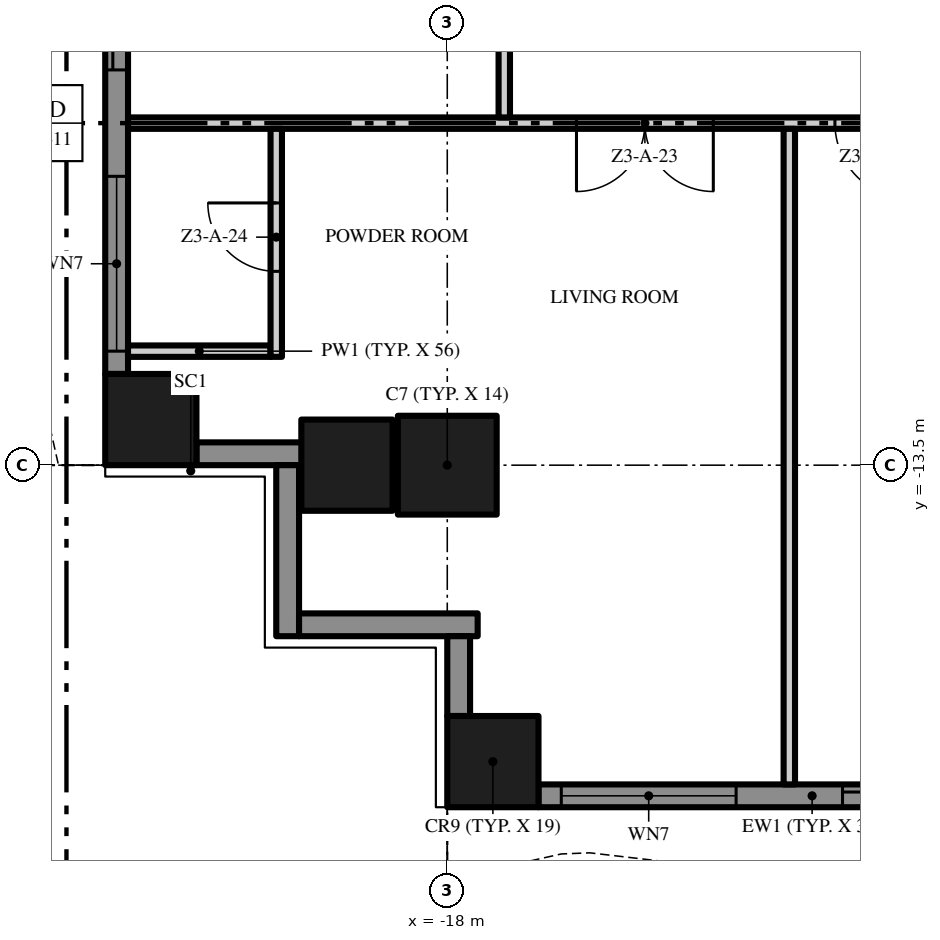
"""IFC4 building model, lengths in metres.
Left out: names, types, materials, properties, quantities, classifications, styles, units other than length and angle.
Written with IfcOpenShell. Run it as: python <this file> out.ifc"""

import sys

from ifc_helpers import new_model, si_unit, direction, frame, frame_2d, origin, origin_2d, place, context, subcontext, project, spatial, polyline, rectangle, outline, extrude, element, fill, save


model = new_model("IFC4")
c1 = context("Model", 3, precision=1e-05, world=origin(), true_north=direction((0.0, 1.0)))
c2 = subcontext(c1, "Body", "Model", "MODEL_VIEW")
j1 = project(units=[si_unit("LENGTHUNIT", "METRE"), si_unit("PLANEANGLEUNIT", "RADIAN")], contexts=[c1])
p1 = place(None, origin())
s1 = spatial("IfcSite", under=j1, at=p1, CompositionType="ELEMENT")
p2 = place(p1, origin())
s2 = spatial("IfcBuilding", under=s1, at=p2, CompositionType="ELEMENT")
p3 = place(p2, frame((0.0, 0.0, 132.6)))
s3 = spatial("IfcBuildingStorey", under=s2, at=p3, CompositionType="ELEMENT", Elevation=132.6)
p4 = place(p3, frame((-18.0, -13.5, 0.0), z_axis=(0.0, 0.0, 1.0), x_axis=(1.0, 0.0, 0.0)))
e1 = element("IfcColumn", 1, at=p4, inside=s3, PredefinedType="COLUMN", context=c2, shape_type="SweptSolid", body=[
    extrude(rectangle(XDim=1.3, YDim=1.3, at=origin_2d()), origin(), (0.0, 0.0, 1.0), 3.5),
])
for number, where, z_axis, x_axis in (
    (2, (-17.4, -17.4, 0.0), (0.0, 0.0, 1.0), (1.0, 0.0, 0.0)),
    (3, (-21.9, -12.9, 0.0), (0.0, 0.0, 1.0), (1.0, 0.0, 0.0)),
    (4, (-19.32, -13.5, 0.0), (0.0, 0.0, 1.0), (1.0, 0.0, 0.0)),
):
    element("IfcColumn", number, at=place(p3, frame(where, z_axis=z_axis, x_axis=x_axis)), inside=s3, PredefinedType="COLUMN", context=c2, shape_type="SweptSolid", body=[
        extrude(rectangle(XDim=1.2, YDim=1.2, at=origin_2d()), origin(), (0.0, 0.0, 1.0), 3.5),
    ])
p5 = place(p3, frame((-9.6, -17.85, 0.0), z_axis=(0.0, 0.0, 1.0), x_axis=(-1.0, 0.0, 0.0)))
e5 = element("IfcWall", 5, at=p5, inside=s3, PredefinedType="SOLIDWALL", context=c2, shape_type="SweptSolid", body=[
    extrude(rectangle(XDim=7.2, YDim=0.3, at=frame_2d((3.6, 0.0))), origin(), (0.0, 0.0, 1.0), 3.5),
])
p6 = place(p5, frame((4.6, 0.0, 0.45)))
e6 = element("IfcOpeningElement", 6, at=p6, cuts=e5, PredefinedType="OPENING", context=c2, shape_type="SweptSolid", body=[
    extrude(rectangle(XDim=2.3, YDim=2.65, at=frame_2d((1.15, 1.325))), frame((0.0, 0.16, 0.0), z_axis=(0.0, -1.0, 0.0), x_axis=(1.0, 0.0, 0.0)), (0.0, 0.0, 1.0), 0.32),
])
p7 = place(p5, frame((0.3, 0.0, 0.0)))
e7 = element("IfcOpeningElement", 7, at=p7, cuts=e5, PredefinedType="OPENING", context=c2, shape_type="SweptSolid", body=[
    extrude(rectangle(XDim=2.9, YDim=2.4, at=frame_2d((1.45, 1.2))), frame((0.0, 0.16, 0.0), z_axis=(0.0, -1.0, 0.0), x_axis=(1.0, 0.0, 0.0)), (0.0, 0.0, 1.0), 0.32),
])
p8 = place(p3, frame((-22.35, -12.3, 0.0), z_axis=(0.0, 0.0, 1.0), x_axis=(0.0, 1.0, 0.0)))
e8 = element("IfcWall", 8, at=p8, inside=s3, PredefinedType="SOLIDWALL", context=c2, shape_type="SweptSolid", body=[
    extrude(rectangle(XDim=7.2, YDim=0.3, at=frame_2d((3.6, 0.0))), origin(), (0.0, 0.0, 1.0), 3.5),
])
p9 = place(p8, frame((4.0, 0.0, 0.0)))
e9 = element("IfcOpeningElement", 9, at=p9, cuts=e8, PredefinedType="OPENING", context=c2, shape_type="SweptSolid", body=[
    extrude(rectangle(XDim=2.9, YDim=2.4, at=frame_2d((1.45, 1.2))), frame((0.0, 0.16, 0.0), z_axis=(0.0, -1.0, 0.0), x_axis=(1.0, 0.0, 0.0)), (0.0, 0.0, 1.0), 0.32),
])
p10 = place(p8, frame((0.3, 0.0, 0.45)))
e10 = element("IfcOpeningElement", 10, at=p10, cuts=e8, PredefinedType="OPENING", context=c2, shape_type="SweptSolid", body=[
    extrude(rectangle(XDim=2.3, YDim=2.65, at=frame_2d((1.15, 1.325))), frame((0.0, 0.16, 0.0), z_axis=(0.0, -1.0, 0.0), x_axis=(1.0, 0.0, 0.0)), (0.0, 0.0, 1.0), 0.32),
])
p11 = place(p3, frame((-19.85, -13.35, 0.0), z_axis=(0.0, 0.0, 1.0), x_axis=(-1.0, 0.0, 0.0)))
e11 = element("IfcWall", 11, at=p11, inside=s3, PredefinedType="SOLIDWALL", context=c2, shape_type="SweptSolid", body=[
    extrude(rectangle(XDim=1.45, YDim=0.3, at=frame_2d((0.725, 0.0))), origin(), (0.0, 0.0, 1.0), 3.5),
])
p12 = place(p3, frame((-20.1, -15.75, 0.0), z_axis=(0.0, 0.0, 1.0), x_axis=(0.0, 1.0, 0.0)))
e12 = element("IfcWall", 12, at=p12, inside=s3, PredefinedType="SOLIDWALL", context=c2, shape_type="SweptSolid", body=[
    extrude(rectangle(XDim=2.25, YDim=0.3, at=frame_2d((1.125, 0.0))), origin(), (0.0, 0.0, 1.0), 3.5),
])
p13 = place(p3, frame((-17.6, -15.6, 0.0), z_axis=(0.0, 0.0, 1.0), x_axis=(-1.0, 0.0, 0.0)))
e13 = element("IfcWall", 13, at=p13, inside=s3, PredefinedType="SOLIDWALL", context=c2, shape_type="SweptSolid", body=[
    extrude(rectangle(XDim=2.35, YDim=0.3, at=frame_2d((1.175, 0.0))), origin(), (0.0, 0.0, 1.0), 3.5),
])
p14 = place(p3, frame((-17.85, -16.8, 0.0), z_axis=(0.0, 0.0, 1.0), x_axis=(0.0, 1.0, 0.0)))
e14 = element("IfcWall", 14, at=p14, inside=s3, PredefinedType="SOLIDWALL", context=c2, shape_type="SweptSolid", body=[
    extrude(rectangle(XDim=1.05, YDim=0.3, at=frame_2d((0.525, 0.0))), origin(), (0.0, 0.0, 1.0), 3.5),
])
p15 = place(p3, origin())
e15 = element("IfcWall", 15, at=p15, inside=s3, PredefinedType="USERDEFINED", context=c2, shape_type="SweptSolid", body=[
    extrude(outline(polyline([(-18.0, -18.951), (-16.5, -18.615), (-16.125, -18.6), (-15.0, -18.731), (-13.5, -19.255), (-12.0, -19.988), (-10.5, -20.649), (-9.0, -20.985), (-8.625, -21.0), (-7.5, -20.869), (-6.0, -20.345), (-4.5, -19.612), (-3.0, -18.951), (-1.5, -18.615), (-1.125, -18.6), (0.0, -18.731), (1.5, -19.255), (3.0, -19.988), (4.5, -20.649), (6.0, -20.985), (6.375, -21.0), (7.5, -20.869), (9.0, -20.345), (10.5, -19.612), (12.0, -18.951), (13.5, -18.615), (13.875, -18.6), (15.0, -18.731), (16.5, -19.255), (18.0, -19.988), (18.11, -19.763), (16.596, -19.024), (15.056, -18.486), (13.885, -18.349), (13.467, -18.366), (11.921, -18.713), (10.395, -19.385), (8.904, -20.114), (7.444, -20.624), (6.365, -20.749), (6.033, -20.736), (4.579, -20.41), (3.105, -19.761), (1.596, -19.024), (0.056, -18.486), (-1.115, -18.349), (-1.533, -18.366), (-3.079, -18.713), (-4.605, -19.385), (-6.096, -20.114), (-7.556, -20.624), (-8.635, -20.749), (-8.967, -20.736), (-10.421, -20.41), (-11.895, -19.761), (-13.404, -19.024), (-14.944, -18.486), (-16.115, -18.349), (-16.533, -18.366), (-18.055, -18.708), (-18.0, -18.951)])), origin(), (0.0, 0.0, 1.0), 0.9),
])
p16 = place(p3, origin())
e16 = element("IfcWall", 16, at=p16, inside=s3, PredefinedType="USERDEFINED", context=c2, shape_type="SweptSolid", body=[
    extrude(outline(polyline([(-23.451, 18.0), (-23.115, 16.5), (-23.1, 16.125), (-23.231, 15.0), (-23.755, 13.5), (-24.488, 12.0), (-25.149, 10.5), (-25.485, 9.0), (-25.5, 8.625), (-25.369, 7.5), (-24.845, 6.0), (-24.112, 4.5), (-23.451, 3.0), (-23.115, 1.5), (-23.1, 1.125), (-23.231, 0.0), (-23.755, -1.5), (-24.488, -3.0), (-25.149, -4.5), (-25.485, -6.0), (-25.5, -6.375), (-25.369, -7.5), (-24.845, -9.0), (-24.112, -10.5), (-23.451, -12.0), (-23.115, -13.5), (-22.871, -13.445), (-23.213, -11.921), (-23.885, -10.395), (-24.614, -8.904), (-25.124, -7.444), (-25.249, -6.365), (-25.236, -6.033), (-24.91, -4.579), (-24.261, -3.105), (-23.524, -1.596), (-22.986, -0.056), (-22.849, 1.115), (-22.866, 1.533), (-23.213, 3.079), (-23.885, 4.605), (-24.614, 6.096), (-25.124, 7.556), (-25.249, 8.635), (-25.236, 8.967), (-24.91, 10.421), (-24.261, 11.895), (-23.524, 13.404), (-22.986, 14.944), (-22.849, 16.115), (-22.866, 16.533), (-23.208, 18.055), (-23.451, 18.0)])), origin(), (0.0, 0.0, 1.0), 0.9),
])
p17 = place(p3, frame((-22.2, -12.0, 0.0), z_axis=(0.0, 0.0, 1.0), x_axis=(1.0, 0.0, 0.0)))
e17 = element("IfcWall", 17, at=p17, inside=s3, PredefinedType="PARTITIONING", context=c2, shape_type="SweptSolid", body=[
    extrude(rectangle(XDim=1.875, YDim=0.15, at=frame_2d((0.938, 0.0))), origin(), (0.0, 0.0, 1.0), 3.5),
])
p18 = place(p3, frame((-11.325, -9.0, 0.0), z_axis=(0.0, 0.0, 1.0), x_axis=(-1.0, 0.0, 0.0)))
e18 = element("IfcWall", 18, at=p18, inside=s3, PredefinedType="PARTITIONING", context=c2, shape_type="SweptSolid", body=[
    extrude(rectangle(XDim=10.875, YDim=0.15, at=frame_2d((5.438, 0.0))), origin(), (0.0, 0.0, 1.0), 3.5),
])
p19 = place(p18, frame((3.175, 0.0, 0.0)))
e19 = element("IfcOpeningElement", 19, at=p19, cuts=e18, PredefinedType="OPENING", context=c2, shape_type="SweptSolid", body=[
    extrude(rectangle(XDim=1.8, YDim=2.4, at=frame_2d((0.9, 1.2))), frame((0.0, 0.085, 0.0), z_axis=(0.0, -1.0, 0.0), x_axis=(1.0, 0.0, 0.0)), (0.0, 0.0, 1.0), 0.17),
])
p20 = place(p18, frame((0.575, 0.0, 0.0)))
e20 = element("IfcOpeningElement", 20, at=p20, cuts=e18, PredefinedType="OPENING", context=c2, shape_type="SweptSolid", body=[
    extrude(rectangle(XDim=1.0, YDim=2.4, at=frame_2d((0.5, 1.2))), frame((0.0, 0.085, 0.0), z_axis=(0.0, -1.0, 0.0), x_axis=(1.0, 0.0, 0.0)), (0.0, 0.0, 1.0), 0.17),
])
p21 = place(p3, frame((-20.25, -12.075, 0.0), z_axis=(0.0, 0.0, 1.0), x_axis=(0.0, 1.0, 0.0)))
e21 = element("IfcWall", 21, at=p21, inside=s3, PredefinedType="PARTITIONING", context=c2, shape_type="SweptSolid", body=[
    extrude(rectangle(XDim=3.0, YDim=0.15, at=frame_2d((1.5, 0.0))), origin(), (0.0, 0.0, 1.0), 3.5),
])
p22 = place(p21, frame((1.125, 0.0, 0.0)))
e22 = element("IfcOpeningElement", 22, at=p22, cuts=e21, PredefinedType="OPENING", context=c2, shape_type="SweptSolid", body=[
    extrude(rectangle(XDim=0.9, YDim=2.1, at=frame_2d((0.45, 1.05))), frame((0.0, 0.085, 0.0), z_axis=(0.0, -1.0, 0.0), x_axis=(1.0, 0.0, 0.0)), (0.0, 0.0, 1.0), 0.17),
])
p23 = place(p3, frame((-17.25, -8.925, 0.0), z_axis=(0.0, 0.0, 1.0), x_axis=(0.0, 1.0, 0.0)))
e23 = element("IfcWall", 23, at=p23, inside=s3, PredefinedType="PARTITIONING", context=c2, shape_type="SweptSolid", body=[
    extrude(rectangle(XDim=4.5, YDim=0.15, at=frame_2d((2.25, 0.0))), origin(), (0.0, 0.0, 1.0), 3.5),
])
p24 = place(p3, frame((-13.5, -17.7, 0.0), z_axis=(0.0, 0.0, 1.0), x_axis=(0.0, 1.0, 0.0)))
e24 = element("IfcWall", 24, at=p24, inside=s3, PredefinedType="PARTITIONING", context=c2, shape_type="SweptSolid", body=[
    extrude(rectangle(XDim=8.625, YDim=0.15, at=frame_2d((4.312, 0.0))), origin(), (0.0, 0.0, 1.0), 3.5),
])
p25 = place(p6, origin())
e25 = element("IfcWindow", 25, at=p25, inside=s3, PartitioningType="SINGLE_PANEL", PredefinedType="WINDOW", context=c2, shape_type="SweptSolid", body=[
    extrude(rectangle(XDim=2.3, YDim=2.65, at=frame_2d((1.15, 1.325))), frame((0.0, 0.03, 0.0), z_axis=(0.0, -1.0, 0.0), x_axis=(1.0, 0.0, 0.0)), (0.0, 0.0, 1.0), 0.06),
])
fill(e6, e25)
p26 = place(p7, origin())
e26 = element("IfcDoor", 26, at=p26, inside=s3, OperationType="SINGLE_SWING_LEFT", PredefinedType="DOOR", context=c2, shape_type="SweptSolid", body=[
    extrude(rectangle(XDim=2.9, YDim=2.4, at=frame_2d((1.45, 1.2))), frame((0.0, 0.025, 0.0), z_axis=(0.0, -1.0, 0.0), x_axis=(1.0, 0.0, 0.0)), (0.0, 0.0, 1.0), 0.05),
])
fill(e7, e26)
p27 = place(p9, origin())
e27 = element("IfcDoor", 27, at=p27, inside=s3, OperationType="SINGLE_SWING_LEFT", PredefinedType="DOOR", context=c2, shape_type="SweptSolid", body=[
    extrude(rectangle(XDim=2.9, YDim=2.4, at=frame_2d((1.45, 1.2))), frame((0.0, 0.025, 0.0), z_axis=(0.0, -1.0, 0.0), x_axis=(1.0, 0.0, 0.0)), (0.0, 0.0, 1.0), 0.05),
])
fill(e9, e27)
p28 = place(p10, origin())
e28 = element("IfcWindow", 28, at=p28, inside=s3, PartitioningType="SINGLE_PANEL", PredefinedType="WINDOW", context=c2, shape_type="SweptSolid", body=[
    extrude(rectangle(XDim=2.3, YDim=2.65, at=frame_2d((1.15, 1.325))), frame((0.0, 0.03, 0.0), z_axis=(0.0, -1.0, 0.0), x_axis=(1.0, 0.0, 0.0)), (0.0, 0.0, 1.0), 0.06),
])
fill(e10, e28)
p29 = place(p19, origin())
e29 = element("IfcDoor", 29, at=p29, inside=s3, OperationType="DOUBLE_DOOR_SINGLE_SWING", PredefinedType="DOOR", context=c2, shape_type="SweptSolid", body=[
    extrude(rectangle(XDim=1.8, YDim=2.4, at=frame_2d((0.9, 1.2))), frame((0.0, 0.025, 0.0), z_axis=(0.0, -1.0, 0.0), x_axis=(1.0, 0.0, 0.0)), (0.0, 0.0, 1.0), 0.05),
])
fill(e19, e29)
p30 = place(p22, origin())
e30 = element("IfcDoor", 30, at=p30, inside=s3, OperationType="SINGLE_SWING_RIGHT", PredefinedType="DOOR", context=c2, shape_type="SweptSolid", body=[
    extrude(rectangle(XDim=0.9, YDim=2.1, at=frame_2d((0.45, 1.05))), frame((0.0, 0.025, 0.0), z_axis=(0.0, -1.0, 0.0), x_axis=(1.0, 0.0, 0.0)), (0.0, 0.0, 1.0), 0.05),
])
fill(e22, e30)
p31 = place(p20, origin())
e31 = element("IfcDoor", 31, at=p31, inside=s3, OperationType="SINGLE_SWING_LEFT", PredefinedType="DOOR", context=c2, shape_type="SweptSolid", body=[
    extrude(rectangle(XDim=1.0, YDim=2.4, at=frame_2d((0.5, 1.2))), frame((0.0, 0.025, 0.0), z_axis=(0.0, -1.0, 0.0), x_axis=(1.0, 0.0, 0.0)), (0.0, 0.0, 1.0), 0.05),
])
fill(e20, e31)
save(model, sys.argv[1])
